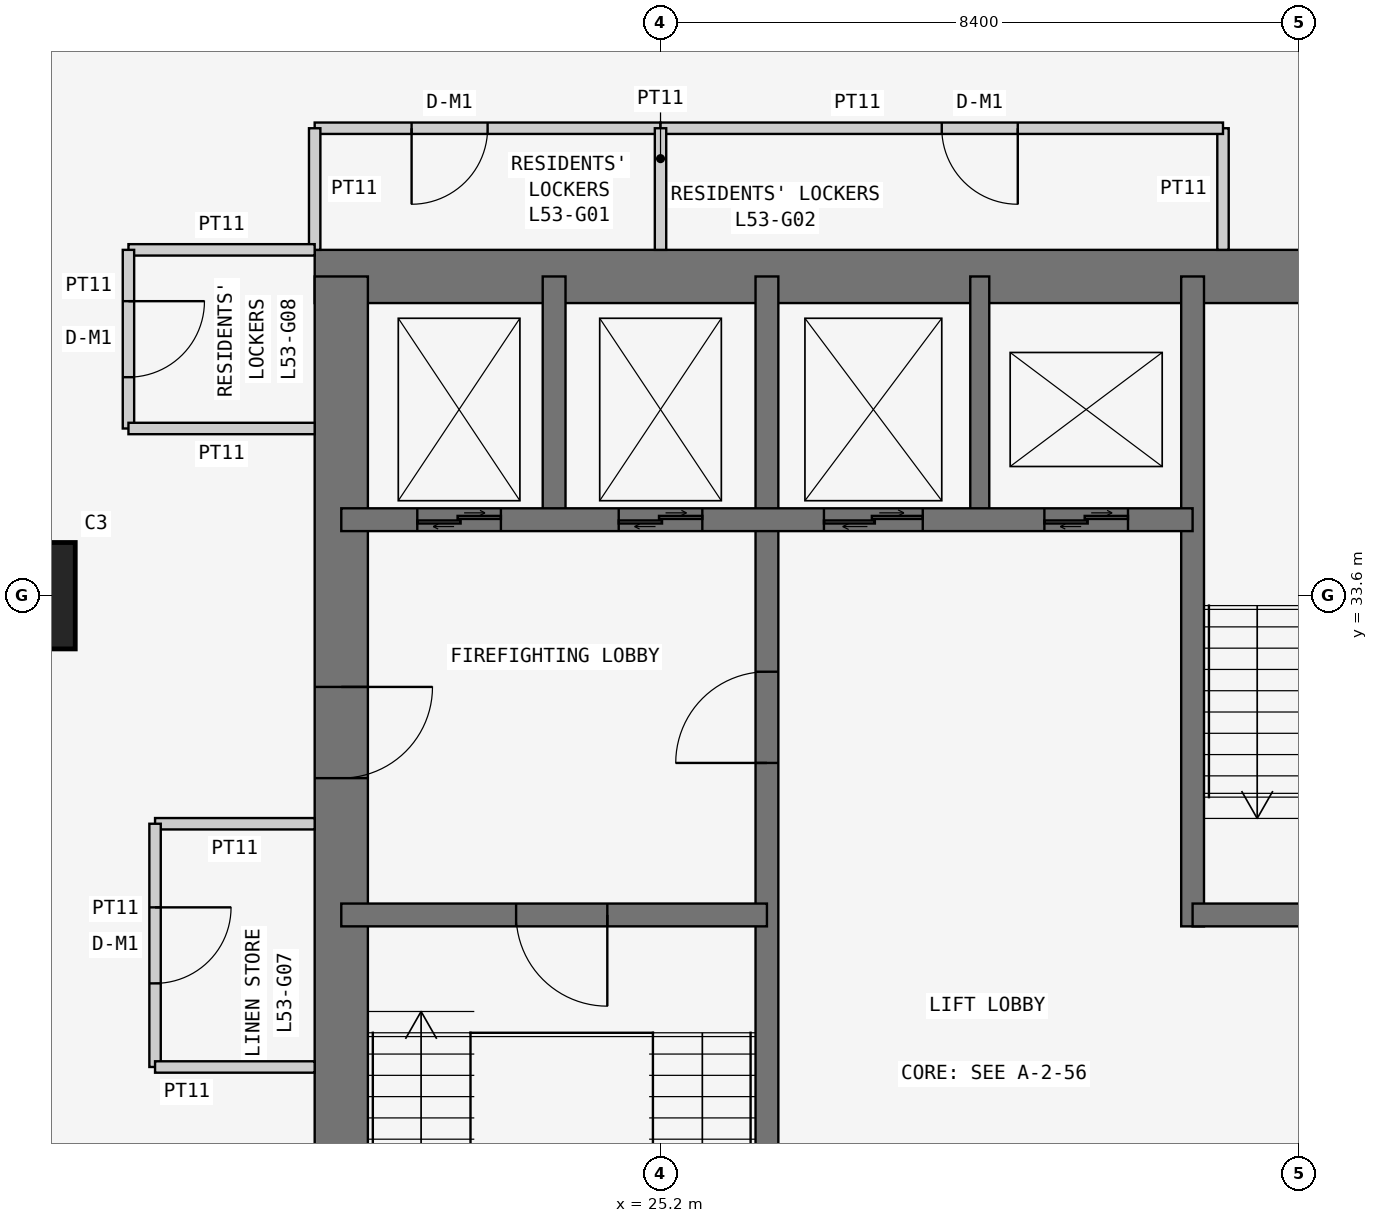
"""IFC4 building model, lengths in metres.
Left out: names, types, materials, properties, quantities, classifications, styles, units other than length and angle.
Written with IfcOpenShell. Run it as: python <this file> out.ifc"""

import sys

from ifc_helpers import new_model, si_unit, direction, frame, frame_2d, origin, origin_2d, place, context, subcontext, project, spatial, rectangle, extrude, element, fill, save


model = new_model("IFC4")
c1 = context("Model", 3, precision=1e-05, world=origin(), true_north=direction((0.0, 1.0)))
c2 = subcontext(c1, "Body", "Model", "MODEL_VIEW")
j1 = project(units=[si_unit("LENGTHUNIT", "METRE"), si_unit("PLANEANGLEUNIT", "RADIAN")], contexts=[c1])
p1 = place(None, origin())
s1 = spatial("IfcSite", under=j1, at=p1, CompositionType="ELEMENT")
p2 = place(p1, origin())
s2 = spatial("IfcBuilding", under=s1, at=p2, CompositionType="ELEMENT")
p3 = place(p2, frame((0.0, 0.0, 204.9)))
s3 = spatial("IfcBuildingStorey", under=s2, at=p3, CompositionType="ELEMENT", Elevation=204.9)
p4 = place(p3, frame((16.8, 33.6, 0.0), z_axis=(0.0, 0.0, 1.0), x_axis=(1.0, 0.0, 0.0)))
e1 = element("IfcColumn", 1, at=p4, inside=s3, PredefinedType="COLUMN", context=c2, shape_type="SweptSolid", body=[
    extrude(rectangle(XDim=1.4, YDim=1.4, at=origin_2d()), origin(), (0.0, 0.0, 1.0), 3.6),
])
p5 = place(p3, frame((37.8, 37.8, 0.0), z_axis=(0.0, 0.0, 1.0), x_axis=(-1.0, 0.0, 0.0)))
e2 = element("IfcWall", 2, at=p5, inside=s3, PredefinedType="SHEAR", context=c2, shape_type="SweptSolid", body=[
    extrude(rectangle(XDim=17.15, YDim=0.7, at=frame_2d((8.575, 0.0))), origin(), (0.0, 0.0, 1.0), 3.6),
])
p6 = place(p3, frame((21.0, 37.8, 0.0), z_axis=(0.0, 0.0, 1.0), x_axis=(0.0, -1.0, 0.0)))
e3 = element("IfcWall", 3, at=p6, inside=s3, PredefinedType="SHEAR", context=c2, shape_type="SweptSolid", body=[
    extrude(rectangle(XDim=17.15, YDim=0.7, at=frame_2d((8.575, 0.0))), origin(), (0.0, 0.0, 1.0), 3.6),
])
p7 = place(p6, frame((5.4, 0.0, 0.0)))
e4 = element("IfcOpeningElement", 4, at=p7, cuts=e3, PredefinedType="OPENING", context=c2, shape_type="SweptSolid", body=[
    extrude(rectangle(XDim=1.2, YDim=2.1, at=frame_2d((0.6, 1.05))), frame((0.0, 0.36, 0.0), z_axis=(0.0, -1.0, 0.0), x_axis=(1.0, 0.0, 0.0)), (0.0, 0.0, 1.0), 0.72),
])
p8 = place(p3, frame((26.6, 21.0, 0.0), z_axis=(0.0, 0.0, 1.0), x_axis=(0.0, 1.0, 0.0)))
e5 = element("IfcWall", 5, at=p8, inside=s3, PredefinedType="SHEAR", context=c2, shape_type="SweptSolid", body=[
    extrude(rectangle(XDim=16.8, YDim=0.3, at=frame_2d((8.4, 0.0))), origin(), (0.0, 0.0, 1.0), 3.6),
])
p9 = place(p8, frame((10.4, 0.0, 0.0)))
e6 = element("IfcOpeningElement", 6, at=p9, cuts=e5, PredefinedType="OPENING", context=c2, shape_type="SweptSolid", body=[
    extrude(rectangle(XDim=1.2, YDim=2.1, at=frame_2d((0.6, 1.05))), frame((0.0, 0.16, 0.0), z_axis=(0.0, -1.0, 0.0), x_axis=(1.0, 0.0, 0.0)), (0.0, 0.0, 1.0), 0.32),
])
p10 = place(p3, frame((21.0, 29.4, 0.0), z_axis=(0.0, 0.0, 1.0), x_axis=(1.0, 0.0, 0.0)))
e7 = element("IfcWall", 7, at=p10, inside=s3, PredefinedType="SHEAR", context=c2, shape_type="SweptSolid", body=[
    extrude(rectangle(XDim=5.6, YDim=0.3, at=frame_2d((2.8, 0.0))), origin(), (0.0, 0.0, 1.0), 3.6),
])
p11 = place(p10, frame((2.3, 0.0, 0.0)))
e8 = element("IfcOpeningElement", 8, at=p11, cuts=e7, PredefinedType="OPENING", context=c2, shape_type="SweptSolid", body=[
    extrude(rectangle(XDim=1.2, YDim=2.1, at=frame_2d((0.6, 1.05))), frame((0.0, 0.16, 0.0), z_axis=(0.0, -1.0, 0.0), x_axis=(1.0, 0.0, 0.0)), (0.0, 0.0, 1.0), 0.32),
])
p12 = place(p3, frame((21.0, 34.6, 0.0), z_axis=(0.0, 0.0, 1.0), x_axis=(1.0, 0.0, 0.0)))
e9 = element("IfcWall", 9, at=p12, inside=s3, PredefinedType="SHEAR", context=c2, shape_type="SweptSolid", body=[
    extrude(rectangle(XDim=11.2, YDim=0.3, at=frame_2d((5.6, 0.0))), origin(), (0.0, 0.0, 1.0), 3.6),
])
p13 = place(p12, frame((9.25, 0.0, 0.0)))
e10 = element("IfcOpeningElement", 10, at=p13, cuts=e9, PredefinedType="OPENING", context=c2, shape_type="SweptSolid", body=[
    extrude(rectangle(XDim=1.1, YDim=2.1, at=frame_2d((0.55, 1.05))), frame((0.0, 0.16, 0.0), z_axis=(0.0, -1.0, 0.0), x_axis=(1.0, 0.0, 0.0)), (0.0, 0.0, 1.0), 0.32),
])
p14 = place(p12, frame((1.0, 0.0, 0.0)))
e11 = element("IfcOpeningElement", 11, at=p14, cuts=e9, PredefinedType="OPENING", context=c2, shape_type="SweptSolid", body=[
    extrude(rectangle(XDim=1.1, YDim=2.1, at=frame_2d((0.55, 1.05))), frame((0.0, 0.16, 0.0), z_axis=(0.0, -1.0, 0.0), x_axis=(1.0, 0.0, 0.0)), (0.0, 0.0, 1.0), 0.32),
])
p15 = place(p12, frame((3.65, 0.0, 0.0)))
e12 = element("IfcOpeningElement", 12, at=p15, cuts=e9, PredefinedType="OPENING", context=c2, shape_type="SweptSolid", body=[
    extrude(rectangle(XDim=1.1, YDim=2.1, at=frame_2d((0.55, 1.05))), frame((0.0, 0.16, 0.0), z_axis=(0.0, -1.0, 0.0), x_axis=(1.0, 0.0, 0.0)), (0.0, 0.0, 1.0), 0.32),
])
p16 = place(p12, frame((6.35, 0.0, 0.0)))
e13 = element("IfcOpeningElement", 13, at=p16, cuts=e9, PredefinedType="OPENING", context=c2, shape_type="SweptSolid", body=[
    extrude(rectangle(XDim=1.3, YDim=2.1, at=frame_2d((0.65, 1.05))), frame((0.0, 0.16, 0.0), z_axis=(0.0, -1.0, 0.0), x_axis=(1.0, 0.0, 0.0)), (0.0, 0.0, 1.0), 0.32),
])
p17 = place(p3, frame((23.8, 34.6, 0.0), z_axis=(0.0, 0.0, 1.0), x_axis=(0.0, 1.0, 0.0)))
e14 = element("IfcWall", 14, at=p17, inside=s3, PredefinedType="SHEAR", context=c2, shape_type="SweptSolid", body=[
    extrude(rectangle(XDim=3.2, YDim=0.3, at=frame_2d((1.6, 0.0))), origin(), (0.0, 0.0, 1.0), 3.6),
])
p18 = place(p3, frame((32.2, 29.25, 0.0), z_axis=(0.0, 0.0, 1.0), x_axis=(0.0, 1.0, 0.0)))
e15 = element("IfcWall", 15, at=p18, inside=s3, PredefinedType="SHEAR", context=c2, shape_type="SweptSolid", body=[
    extrude(rectangle(XDim=8.55, YDim=0.3, at=frame_2d((4.275, 0.0))), origin(), (0.0, 0.0, 1.0), 3.6),
])
p19 = place(p3, frame((32.2, 29.4, 0.0), z_axis=(0.0, 0.0, 1.0), x_axis=(1.0, 0.0, 0.0)))
e16 = element("IfcWall", 16, at=p19, inside=s3, PredefinedType="SHEAR", context=c2, shape_type="SweptSolid", body=[
    extrude(rectangle(XDim=5.6, YDim=0.3, at=frame_2d((2.8, 0.0))), origin(), (0.0, 0.0, 1.0), 3.6),
])
p20 = place(p19, frame((2.0, 0.0, 0.0)))
e17 = element("IfcOpeningElement", 17, at=p20, cuts=e16, PredefinedType="OPENING", context=c2, shape_type="SweptSolid", body=[
    extrude(rectangle(XDim=1.2, YDim=2.1, at=frame_2d((0.6, 1.05))), frame((0.0, 0.16, 0.0), z_axis=(0.0, -1.0, 0.0), x_axis=(1.0, 0.0, 0.0)), (0.0, 0.0, 1.0), 0.32),
])
p21 = place(p3, frame((29.4, 34.6, 0.0), z_axis=(0.0, 0.0, 1.0), x_axis=(0.0, 1.0, 0.0)))
e18 = element("IfcWall", 18, at=p21, inside=s3, PredefinedType="SHEAR", context=c2, shape_type="SweptSolid", body=[
    extrude(rectangle(XDim=3.2, YDim=0.25, at=frame_2d((1.6, 0.0))), origin(), (0.0, 0.0, 1.0), 3.6),
])
p22 = place(p3, frame((25.2, 39.75, 0.0), z_axis=(0.0, 0.0, 1.0), x_axis=(-1.0, 0.0, 0.0)))
e19 = element("IfcWall", 19, at=p22, inside=s3, PredefinedType="PARTITIONING", context=c2, shape_type="SweptSolid", body=[
    extrude(rectangle(XDim=4.55, YDim=0.15, at=frame_2d((2.275, 0.0))), origin(), (0.0, 0.0, 1.0), 3.45),
])
p23 = place(p22, frame((2.275, 0.0, 0.0)))
e20 = element("IfcOpeningElement", 20, at=p23, cuts=e19, PredefinedType="OPENING", context=c2, shape_type="SweptSolid", body=[
    extrude(rectangle(XDim=1.0, YDim=2.1, at=frame_2d((0.5, 1.05))), frame((0.0, 0.085, 0.0), z_axis=(0.0, -1.0, 0.0), x_axis=(1.0, 0.0, 0.0)), (0.0, 0.0, 1.0), 0.17),
])
for number, where, z_axis, x_axis in (
    (21, (20.65, 39.75, 0.0), (0.0, 0.0, 1.0), (0.0, -1.0, 0.0)),
    (22, (32.6, 38.15, 0.0), (0.0, 0.0, 1.0), (0.0, 1.0, 0.0)),
):
    element("IfcWall", number, at=place(p3, frame(where, z_axis=z_axis, x_axis=x_axis)), inside=s3, PredefinedType="PARTITIONING", context=c2, shape_type="SweptSolid", body=[
        extrude(rectangle(XDim=1.6, YDim=0.15, at=frame_2d((0.8, 0.0))), origin(), (0.0, 0.0, 1.0), 3.45),
    ])
p24 = place(p3, frame((32.6, 39.75, 0.0), z_axis=(0.0, 0.0, 1.0), x_axis=(-1.0, 0.0, 0.0)))
e23 = element("IfcWall", 23, at=p24, inside=s3, PredefinedType="PARTITIONING", context=c2, shape_type="SweptSolid", body=[
    extrude(rectangle(XDim=7.4, YDim=0.15, at=frame_2d((3.7, 0.0))), origin(), (0.0, 0.0, 1.0), 3.45),
])
p25 = place(p24, frame((2.7, 0.0, 0.0)))
e24 = element("IfcOpeningElement", 24, at=p25, cuts=e23, PredefinedType="OPENING", context=c2, shape_type="SweptSolid", body=[
    extrude(rectangle(XDim=1.0, YDim=2.1, at=frame_2d((0.5, 1.05))), frame((0.0, 0.085, 0.0), z_axis=(0.0, -1.0, 0.0), x_axis=(1.0, 0.0, 0.0)), (0.0, 0.0, 1.0), 0.17),
])
p26 = place(p3, frame((20.65, 30.6, 0.0), z_axis=(0.0, 0.0, 1.0), x_axis=(-1.0, 0.0, 0.0)))
e25 = element("IfcWall", 25, at=p26, inside=s3, PredefinedType="PARTITIONING", context=c2, shape_type="SweptSolid", body=[
    extrude(rectangle(XDim=2.1, YDim=0.15, at=frame_2d((1.05, 0.0))), origin(), (0.0, 0.0, 1.0), 3.45),
])
p27 = place(p3, frame((18.55, 30.6, 0.0), z_axis=(0.0, 0.0, 1.0), x_axis=(0.0, -1.0, 0.0)))
e26 = element("IfcWall", 26, at=p27, inside=s3, PredefinedType="PARTITIONING", context=c2, shape_type="SweptSolid", body=[
    extrude(rectangle(XDim=3.2, YDim=0.15, at=frame_2d((1.6, 0.0))), origin(), (0.0, 0.0, 1.0), 3.45),
])
p28 = place(p27, frame((1.1, 0.0, 0.0)))
e27 = element("IfcOpeningElement", 27, at=p28, cuts=e26, PredefinedType="OPENING", context=c2, shape_type="SweptSolid", body=[
    extrude(rectangle(XDim=1.0, YDim=2.1, at=frame_2d((0.5, 1.05))), frame((0.0, 0.085, 0.0), z_axis=(0.0, -1.0, 0.0), x_axis=(1.0, 0.0, 0.0)), (0.0, 0.0, 1.0), 0.17),
])
p29 = place(p3, frame((18.55, 27.4, 0.0), z_axis=(0.0, 0.0, 1.0), x_axis=(1.0, 0.0, 0.0)))
e28 = element("IfcWall", 28, at=p29, inside=s3, PredefinedType="PARTITIONING", context=c2, shape_type="SweptSolid", body=[
    extrude(rectangle(XDim=2.1, YDim=0.15, at=frame_2d((1.05, 0.0))), origin(), (0.0, 0.0, 1.0), 3.45),
])
p30 = place(p3, frame((20.65, 38.15, 0.0), z_axis=(0.0, 0.0, 1.0), x_axis=(-1.0, 0.0, 0.0)))
e29 = element("IfcWall", 29, at=p30, inside=s3, PredefinedType="PARTITIONING", context=c2, shape_type="SweptSolid", body=[
    extrude(rectangle(XDim=2.45, YDim=0.15, at=frame_2d((1.225, 0.0))), origin(), (0.0, 0.0, 1.0), 3.45),
])
p31 = place(p3, frame((18.2, 38.15, 0.0), z_axis=(0.0, 0.0, 1.0), x_axis=(0.0, -1.0, 0.0)))
e30 = element("IfcWall", 30, at=p31, inside=s3, PredefinedType="PARTITIONING", context=c2, shape_type="SweptSolid", body=[
    extrude(rectangle(XDim=2.35, YDim=0.15, at=frame_2d((1.175, 0.0))), origin(), (0.0, 0.0, 1.0), 3.45),
])
p32 = place(p31, frame((0.675, 0.0, 0.0)))
e31 = element("IfcOpeningElement", 31, at=p32, cuts=e30, PredefinedType="OPENING", context=c2, shape_type="SweptSolid", body=[
    extrude(rectangle(XDim=1.0, YDim=2.1, at=frame_2d((0.5, 1.05))), frame((0.0, 0.085, 0.0), z_axis=(0.0, -1.0, 0.0), x_axis=(1.0, 0.0, 0.0)), (0.0, 0.0, 1.0), 0.17),
])
p33 = place(p3, frame((18.2, 35.8, 0.0), z_axis=(0.0, 0.0, 1.0), x_axis=(1.0, 0.0, 0.0)))
e32 = element("IfcWall", 32, at=p33, inside=s3, PredefinedType="PARTITIONING", context=c2, shape_type="SweptSolid", body=[
    extrude(rectangle(XDim=2.45, YDim=0.15, at=frame_2d((1.225, 0.0))), origin(), (0.0, 0.0, 1.0), 3.45),
])
p34 = place(p3, frame((25.2, 38.15, 0.0), z_axis=(0.0, 0.0, 1.0), x_axis=(0.0, 1.0, 0.0)))
e33 = element("IfcWall", 33, at=p34, inside=s3, PredefinedType="PARTITIONING", context=c2, shape_type="SweptSolid", body=[
    extrude(rectangle(XDim=1.6, YDim=0.15, at=frame_2d((0.8, 0.0))), origin(), (0.0, 0.0, 1.0), 2.767),
])
p35 = place(p23, origin())
e34 = element("IfcDoor", 34, at=p35, inside=s3, OperationType="SINGLE_SWING_RIGHT", PredefinedType="DOOR", context=c2, shape_type="SweptSolid", body=[
    extrude(rectangle(XDim=1.0, YDim=2.1, at=frame_2d((0.5, 1.05))), frame((0.0, 0.025, 0.0), z_axis=(0.0, -1.0, 0.0), x_axis=(1.0, 0.0, 0.0)), (0.0, 0.0, 1.0), 0.05),
])
fill(e20, e34)
p36 = place(p25, origin())
e35 = element("IfcDoor", 35, at=p36, inside=s3, OperationType="SINGLE_SWING_LEFT", PredefinedType="DOOR", context=c2, shape_type="SweptSolid", body=[
    extrude(rectangle(XDim=1.0, YDim=2.1, at=frame_2d((0.5, 1.05))), frame((0.0, 0.025, 0.0), z_axis=(0.0, -1.0, 0.0), x_axis=(1.0, 0.0, 0.0)), (0.0, 0.0, 1.0), 0.05),
])
fill(e24, e35)
p37 = place(p28, origin())
e36 = element("IfcDoor", 36, at=p37, inside=s3, OperationType="SINGLE_SWING_LEFT", PredefinedType="DOOR", context=c2, shape_type="SweptSolid", body=[
    extrude(rectangle(XDim=1.0, YDim=2.1, at=frame_2d((0.5, 1.05))), frame((0.0, 0.025, 0.0), z_axis=(0.0, -1.0, 0.0), x_axis=(1.0, 0.0, 0.0)), (0.0, 0.0, 1.0), 0.05),
])
fill(e27, e36)
p38 = place(p32, origin())
e37 = element("IfcDoor", 37, at=p38, inside=s3, OperationType="SINGLE_SWING_LEFT", PredefinedType="DOOR", context=c2, shape_type="SweptSolid", body=[
    extrude(rectangle(XDim=1.0, YDim=2.1, at=frame_2d((0.5, 1.05))), frame((0.0, 0.025, 0.0), z_axis=(0.0, -1.0, 0.0), x_axis=(1.0, 0.0, 0.0)), (0.0, 0.0, 1.0), 0.05),
])
fill(e31, e37)
p39 = place(p7, origin())
e38 = element("IfcDoor", 38, at=p39, inside=s3, OperationType="SINGLE_SWING_LEFT", PredefinedType="DOOR", context=c2, shape_type="SweptSolid", body=[
    extrude(rectangle(XDim=1.2, YDim=2.1, at=frame_2d((0.6, 1.05))), frame((0.0, 0.025, 0.0), z_axis=(0.0, -1.0, 0.0), x_axis=(1.0, 0.0, 0.0)), (0.0, 0.0, 1.0), 0.05),
])
fill(e4, e38)
p40 = place(p11, frame((1.2, 0.0, 0.0), z_axis=(0.0, 0.0, 1.0), x_axis=(-1.0, 0.0, 0.0)))
e39 = element("IfcDoor", 39, at=p40, inside=s3, OperationType="SINGLE_SWING_LEFT", PredefinedType="DOOR", context=c2, shape_type="SweptSolid", body=[
    extrude(rectangle(XDim=1.2, YDim=2.1, at=frame_2d((0.6, 1.05))), frame((0.0, 0.025, 0.0), z_axis=(0.0, -1.0, 0.0), x_axis=(1.0, 0.0, 0.0)), (0.0, 0.0, 1.0), 0.05),
])
fill(e8, e39)
p41 = place(p9, origin())
e40 = element("IfcDoor", 40, at=p41, inside=s3, OperationType="SINGLE_SWING_LEFT", PredefinedType="DOOR", context=c2, shape_type="SweptSolid", body=[
    extrude(rectangle(XDim=1.2, YDim=2.1, at=frame_2d((0.6, 1.05))), frame((0.0, 0.025, 0.0), z_axis=(0.0, -1.0, 0.0), x_axis=(1.0, 0.0, 0.0)), (0.0, 0.0, 1.0), 0.05),
])
fill(e6, e40)
p42 = place(p13, origin())
e41 = element("IfcDoor", 41, at=p42, inside=s3, OperationType="DOUBLE_DOOR_SLIDING", PredefinedType="DOOR", context=c2, shape_type="SweptSolid", body=[
    extrude(rectangle(XDim=1.1, YDim=2.1, at=frame_2d((0.55, 1.05))), frame((0.0, 0.025, 0.0), z_axis=(0.0, -1.0, 0.0), x_axis=(1.0, 0.0, 0.0)), (0.0, 0.0, 1.0), 0.05),
])
fill(e10, e41)
p43 = place(p14, origin())
e42 = element("IfcDoor", 42, at=p43, inside=s3, OperationType="DOUBLE_DOOR_SLIDING", PredefinedType="DOOR", context=c2, shape_type="SweptSolid", body=[
    extrude(rectangle(XDim=1.1, YDim=2.1, at=frame_2d((0.55, 1.05))), frame((0.0, 0.025, 0.0), z_axis=(0.0, -1.0, 0.0), x_axis=(1.0, 0.0, 0.0)), (0.0, 0.0, 1.0), 0.05),
])
fill(e11, e42)
p44 = place(p15, origin())
e43 = element("IfcDoor", 43, at=p44, inside=s3, OperationType="DOUBLE_DOOR_SLIDING", PredefinedType="DOOR", context=c2, shape_type="SweptSolid", body=[
    extrude(rectangle(XDim=1.1, YDim=2.1, at=frame_2d((0.55, 1.05))), frame((0.0, 0.025, 0.0), z_axis=(0.0, -1.0, 0.0), x_axis=(1.0, 0.0, 0.0)), (0.0, 0.0, 1.0), 0.05),
])
fill(e12, e43)
p45 = place(p16, origin())
e44 = element("IfcDoor", 44, at=p45, inside=s3, OperationType="DOUBLE_DOOR_SLIDING", PredefinedType="DOOR", context=c2, shape_type="SweptSolid", body=[
    extrude(rectangle(XDim=1.3, YDim=2.1, at=frame_2d((0.65, 1.05))), frame((0.0, 0.025, 0.0), z_axis=(0.0, -1.0, 0.0), x_axis=(1.0, 0.0, 0.0)), (0.0, 0.0, 1.0), 0.05),
])
fill(e13, e44)
save(model, sys.argv[1])
